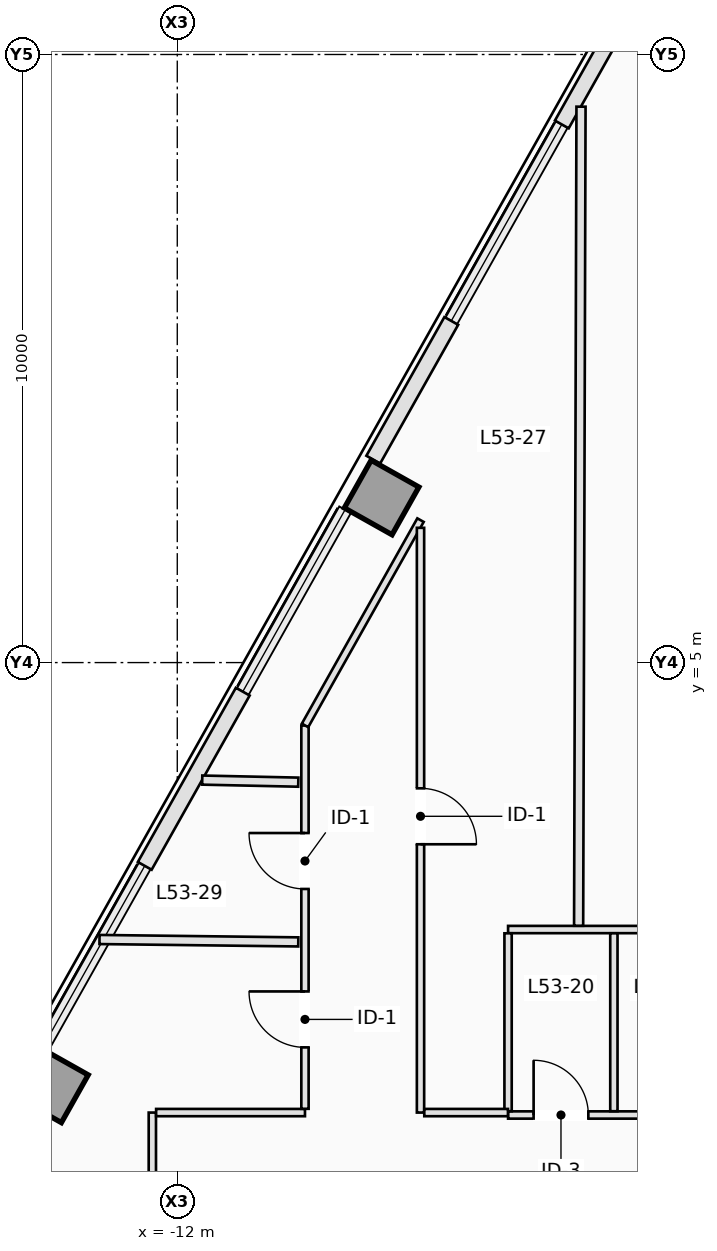
"""IFC4 building model, lengths in metres.
Left out: names, types, materials, properties, quantities, classifications, styles, units other than length and angle.
Written with IfcOpenShell. Run it as: python <this file> out.ifc"""

import sys

from ifc_helpers import new_model, si_unit, direction, frame, frame_2d, origin, origin_2d, place, context, subcontext, project, spatial, rectangle, extrude, element, fill, save


model = new_model("IFC4")
c1 = context("Model", 3, precision=1e-05, world=origin(), true_north=direction((0.0, 1.0)))
c2 = subcontext(c1, "Body", "Model", "MODEL_VIEW")
j1 = project(units=[si_unit("LENGTHUNIT", "METRE"), si_unit("PLANEANGLEUNIT", "RADIAN")], contexts=[c1])
p1 = place(None, origin())
s1 = spatial("IfcSite", under=j1, at=p1, CompositionType="ELEMENT")
p2 = place(p1, origin())
s2 = spatial("IfcBuilding", under=s1, at=p2, CompositionType="ELEMENT")
p3 = place(p2, frame((0.0, 0.0, 193.9)))
s3 = spatial("IfcBuildingStorey", under=s2, at=p3, CompositionType="ELEMENT", Elevation=193.9)
for number, where, z_axis, x_axis in (
    (1, (-8.64, 7.715, 0.0), (0.0, 0.0, 1.0), (-0.872, 0.49, 0.0)),
    (2, (-14.077, -1.952, 0.0), (0.0, 0.0, 1.0), (-0.872, 0.49, 0.0)),
):
    element("IfcColumn", number, at=place(p3, frame(where, z_axis=z_axis, x_axis=x_axis)), inside=s3, PredefinedType="COLUMN", context=c2, shape_type="SweptSolid", body=[
        extrude(rectangle(XDim=0.9, YDim=0.9, at=origin_2d()), origin(), (0.0, 0.0, 1.0), 3.5),
    ])
p4 = place(p3, frame((-8.777, 8.337, 0.0), z_axis=(0.0, 0.0, 1.0), x_axis=(0.490301099378, 0.871553114818, 0.0)))
e3 = element("IfcWall", 3, at=p4, inside=s3, PredefinedType="STANDARD", context=c2, shape_type="SweptSolid", body=[
    extrude(rectangle(XDim=2.617, YDim=0.26, at=frame_2d((1.309, 0.0))), origin(), (0.0, 0.0, 1.0), 3.25),
])
p5 = place(p3, frame((-5.677, 13.85, 0.0), z_axis=(0.0, 0.0, 1.0), x_axis=(0.490275081837, 0.87156775074, 0.0)))
e4 = element("IfcWall", 4, at=p5, inside=s3, PredefinedType="STANDARD", context=c2, shape_type="SweptSolid", body=[
    extrude(rectangle(XDim=4.187, YDim=0.26, at=frame_2d((2.094, 0.0))), origin(), (0.0, 0.0, 1.0), 3.25),
])
p6 = place(p3, frame((-12.535, 1.657, 0.0), z_axis=(0.0, 0.0, 1.0), x_axis=(0.490264765862, 0.871573553611, 0.0)))
e5 = element("IfcWall", 5, at=p6, inside=s3, PredefinedType="STANDARD", context=c2, shape_type="SweptSolid", body=[
    extrude(rectangle(XDim=3.287, YDim=0.26, at=frame_2d((1.644, 0.0))), origin(), (0.0, 0.0, 1.0), 3.25),
])
p7 = place(p3, frame((-6.56, -2.44, 0.0), z_axis=(0.0, 0.0, 1.0), x_axis=(1.0, 0.0, 0.0)))
e6 = element("IfcWall", 6, at=p7, inside=s3, PredefinedType="PARTITIONING", context=c2, shape_type="SweptSolid", body=[
    extrude(rectangle(XDim=5.32, YDim=0.12, at=frame_2d((2.66, 0.0))), origin(), (0.0, 0.0, 1.0), 2.943),
])
p8 = place(p7, frame((0.42, 0.0, 0.0)))
e7 = element("IfcOpeningElement", 7, at=p8, cuts=e6, PredefinedType="OPENING", context=c2, shape_type="SweptSolid", body=[
    extrude(rectangle(XDim=0.9, YDim=2.12, at=frame_2d((0.45, 1.06))), frame((0.0, 0.07, 0.0), z_axis=(0.0, -1.0, 0.0), x_axis=(1.0, 0.0, 0.0)), (0.0, 0.0, 1.0), 0.14),
])
p9 = place(p7, frame((2.16, 0.0, 0.0)))
e8 = element("IfcOpeningElement", 8, at=p9, cuts=e6, PredefinedType="OPENING", context=c2, shape_type="SweptSolid", body=[
    extrude(rectangle(XDim=0.9, YDim=2.12, at=frame_2d((0.45, 1.06))), frame((0.0, 0.07, 0.0), z_axis=(0.0, -1.0, 0.0), x_axis=(1.0, 0.0, 0.0)), (0.0, 0.0, 1.0), 0.14),
])
p10 = place(p7, frame((3.92, 0.0, 0.0)))
e9 = element("IfcOpeningElement", 9, at=p10, cuts=e6, PredefinedType="OPENING", context=c2, shape_type="SweptSolid", body=[
    extrude(rectangle(XDim=0.9, YDim=2.12, at=frame_2d((0.45, 1.06))), frame((0.0, 0.07, 0.0), z_axis=(0.0, -1.0, 0.0), x_axis=(1.0, 0.0, 0.0)), (0.0, 0.0, 1.0), 0.14),
])
p11 = place(p3, frame((-6.56, 0.61, 0.0), z_axis=(0.0, 0.0, 1.0), x_axis=(1.0, 0.0, 0.0)))
e10 = element("IfcWall", 10, at=p11, inside=s3, PredefinedType="PARTITIONING", context=c2, shape_type="SweptSolid", body=[
    extrude(rectangle(XDim=5.32, YDim=0.12, at=frame_2d((2.66, 0.0))), origin(), (0.0, 0.0, 1.0), 3.25),
])
for number, where, z_axis, x_axis in (
    (11, (-6.56, -2.378, 0.0), (0.0, 0.0, 1.0), (0.0, 1.0, 0.0)),
    (12, (-4.82, -2.378, 0.0), (0.0, 0.0, 1.0), (0.0, 1.0, 0.0)),
):
    element("IfcWall", number, at=place(p3, frame(where, z_axis=z_axis, x_axis=x_axis)), inside=s3, PredefinedType="PARTITIONING", context=c2, shape_type="SweptSolid", body=[
        extrude(rectangle(XDim=2.926, YDim=0.12, at=frame_2d((1.463, 0.0))), origin(), (0.0, 0.0, 1.0), 3.25),
    ])
p12 = place(p3, frame((-12.41, -5.073, 0.0), z_axis=(0.0, 0.0, 1.0), x_axis=(0.0, 1.0, 0.0)))
e13 = element("IfcWall", 13, at=p12, inside=s3, PredefinedType="PARTITIONING", context=c2, shape_type="SweptSolid", body=[
    extrude(rectangle(XDim=2.673, YDim=0.12, at=frame_2d((1.336, 0.0))), origin(), (0.0, 0.0, 1.0), 3.25),
])
p13 = place(p3, frame((-12.348, -2.4, 0.0), z_axis=(0.0, 0.0, 1.0), x_axis=(1.0, 0.0, 0.0)))
e14 = element("IfcWall", 14, at=p13, inside=s3, PredefinedType="PARTITIONING", context=c2, shape_type="SweptSolid", body=[
    extrude(rectangle(XDim=2.448, YDim=0.12, at=frame_2d((1.224, 0.0))), origin(), (0.0, 0.0, 1.0), 3.25),
])
p14 = place(p3, frame((-9.9, -2.338, 0.0), z_axis=(0.0, 0.0, 1.0), x_axis=(0.0, 1.0, 0.0)))
e15 = element("IfcWall", 15, at=p14, inside=s3, PredefinedType="PARTITIONING", context=c2, shape_type="SweptSolid", body=[
    extrude(rectangle(XDim=6.303, YDim=0.12, at=frame_2d((3.151, 0.0))), origin(), (0.0, 0.0, 1.0), 3.25),
])
p15 = place(p14, frame((3.615, 0.0, 0.0)))
e16 = element("IfcOpeningElement", 16, at=p15, cuts=e15, PredefinedType="OPENING", context=c2, shape_type="SweptSolid", body=[
    extrude(rectangle(XDim=0.92, YDim=2.12, at=frame_2d((0.46, 1.06))), frame((0.0, 0.07, 0.0), z_axis=(0.0, -1.0, 0.0), x_axis=(1.0, 0.0, 0.0)), (0.0, 0.0, 1.0), 0.14),
])
p16 = place(p14, frame((1.01, 0.0, 0.0)))
e17 = element("IfcOpeningElement", 17, at=p16, cuts=e15, PredefinedType="OPENING", context=c2, shape_type="SweptSolid", body=[
    extrude(rectangle(XDim=0.92, YDim=2.12, at=frame_2d((0.46, 1.06))), frame((0.0, 0.07, 0.0), z_axis=(0.0, -1.0, 0.0), x_axis=(1.0, 0.0, 0.0)), (0.0, 0.0, 1.0), 0.14),
])
p17 = place(p3, frame((-9.899, 3.967, 0.0), z_axis=(0.0, 0.0, 1.0), x_axis=(0.490276203052, 0.871567120032, 0.0)))
e18 = element("IfcWall", 18, at=p17, inside=s3, PredefinedType="PARTITIONING", context=c2, shape_type="SweptSolid", body=[
    extrude(rectangle(XDim=3.873, YDim=0.12, at=frame_2d((1.937, 0.0))), origin(), (0.0, 0.0, 1.0), 3.25),
])
p18 = place(p3, frame((-8.0, 7.216, 0.0), z_axis=(0.0, 0.0, 1.0), x_axis=(0.0, -1.0, 0.0)))
e19 = element("IfcWall", 19, at=p18, inside=s3, PredefinedType="PARTITIONING", context=c2, shape_type="SweptSolid", body=[
    extrude(rectangle(XDim=9.616, YDim=0.12, at=frame_2d((4.808, 0.0))), origin(), (0.0, 0.0, 1.0), 3.25),
])
p19 = place(p18, frame((4.284, 0.0, 0.0)))
e20 = element("IfcOpeningElement", 20, at=p19, cuts=e19, PredefinedType="OPENING", context=c2, shape_type="SweptSolid", body=[
    extrude(rectangle(XDim=0.92, YDim=2.12, at=frame_2d((0.46, 1.06))), frame((0.0, 0.07, 0.0), z_axis=(0.0, -1.0, 0.0), x_axis=(1.0, 0.0, 0.0)), (0.0, 0.0, 1.0), 0.14),
])
p20 = place(p3, frame((-7.938, -2.4, 0.0), z_axis=(0.0, 0.0, 1.0), x_axis=(1.0, 0.0, 0.0)))
e21 = element("IfcWall", 21, at=p20, inside=s3, PredefinedType="PARTITIONING", context=c2, shape_type="SweptSolid", body=[
    extrude(rectangle(XDim=1.376, YDim=0.12, at=frame_2d((0.688, 0.0))), origin(), (0.0, 0.0, 1.0), 3.25),
])
p21 = place(p3, frame((-5.4, 0.672, 0.0), z_axis=(0.0, 0.0, 1.0), x_axis=(0.002918134461, 0.999995742237, 0.0)))
e22 = element("IfcWall", 22, at=p21, inside=s3, PredefinedType="PARTITIONING", context=c2, shape_type="SweptSolid", body=[
    extrude(rectangle(XDim=13.47, YDim=0.15, at=frame_2d((6.735, 0.0))), origin(), (0.0, 0.0, 1.0), 3.25),
])
p22 = place(p3, frame((-10.01, 3.033, 0.0), z_axis=(0.0, 0.0, 1.0), x_axis=(-0.999766045799, 0.021629925268, 0.0)))
e23 = element("IfcWall", 23, at=p22, inside=s3, PredefinedType="PARTITIONING", context=c2, shape_type="SweptSolid", body=[
    extrude(rectangle(XDim=1.58, YDim=0.15, at=frame_2d((0.79, 0.0))), origin(), (0.0, 0.0, 1.0), 3.25),
])
p23 = place(p3, frame((-10.01, 0.406, 0.0), z_axis=(0.0, 0.0, 1.0), x_axis=(-0.999926820202, 0.012097695659, 0.0)))
e24 = element("IfcWall", 24, at=p23, inside=s3, PredefinedType="PARTITIONING", context=c2, shape_type="SweptSolid", body=[
    extrude(rectangle(XDim=3.269, YDim=0.15, at=frame_2d((1.635, 0.0))), origin(), (0.0, 0.0, 1.0), 3.25),
])
p24 = place(p8, origin())
e25 = element("IfcDoor", 25, at=p24, inside=s3, OperationType="SINGLE_SWING_LEFT", PredefinedType="DOOR", context=c2, shape_type="SweptSolid", body=[
    extrude(rectangle(XDim=0.9, YDim=2.12, at=frame_2d((0.45, 1.06))), frame((0.0, 0.025, 0.0), z_axis=(0.0, -1.0, 0.0), x_axis=(1.0, 0.0, 0.0)), (0.0, 0.0, 1.0), 0.05),
])
fill(e7, e25)
p25 = place(p19, origin())
e26 = element("IfcDoor", 26, at=p25, inside=s3, OperationType="SINGLE_SWING_RIGHT", PredefinedType="DOOR", context=c2, shape_type="SweptSolid", body=[
    extrude(rectangle(XDim=0.92, YDim=2.12, at=frame_2d((0.46, 1.06))), frame((0.0, 0.025, 0.0), z_axis=(0.0, -1.0, 0.0), x_axis=(1.0, 0.0, 0.0)), (0.0, 0.0, 1.0), 0.05),
])
fill(e20, e26)
p26 = place(p15, origin())
e27 = element("IfcDoor", 27, at=p26, inside=s3, OperationType="SINGLE_SWING_RIGHT", PredefinedType="DOOR", context=c2, shape_type="SweptSolid", body=[
    extrude(rectangle(XDim=0.92, YDim=2.12, at=frame_2d((0.46, 1.06))), frame((0.0, 0.025, 0.0), z_axis=(0.0, -1.0, 0.0), x_axis=(1.0, 0.0, 0.0)), (0.0, 0.0, 1.0), 0.05),
])
fill(e16, e27)
p27 = place(p16, origin())
e28 = element("IfcDoor", 28, at=p27, inside=s3, OperationType="SINGLE_SWING_RIGHT", PredefinedType="DOOR", context=c2, shape_type="SweptSolid", body=[
    extrude(rectangle(XDim=0.92, YDim=2.12, at=frame_2d((0.46, 1.06))), frame((0.0, 0.025, 0.0), z_axis=(0.0, -1.0, 0.0), x_axis=(1.0, 0.0, 0.0)), (0.0, 0.0, 1.0), 0.05),
])
fill(e17, e28)
save(model, sys.argv[1])
